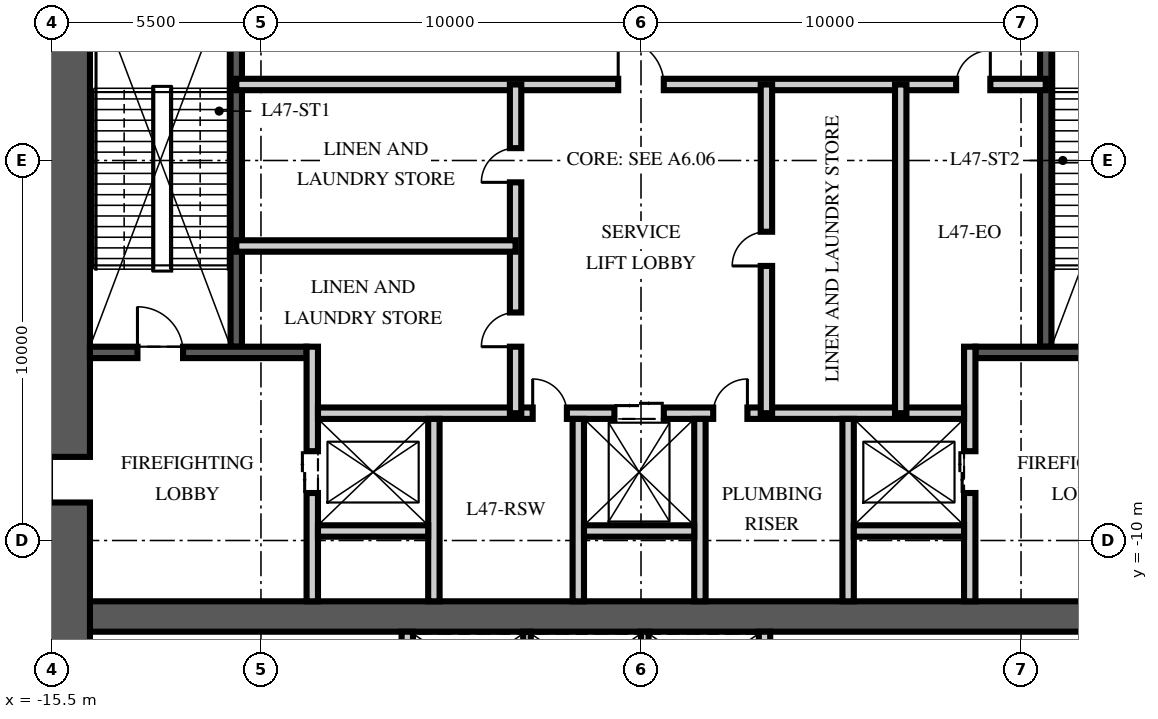
"""IFC4 building model, lengths in metres.
Left out: names, types, materials, properties, quantities, classifications, styles, units other than length and angle.
Written with IfcOpenShell. Run it as: python <this file> out.ifc"""

import sys

from ifc_helpers import new_model, si_unit, direction, frame, frame_2d, origin, place, context, subcontext, project, spatial, rectangle, extrude, element, fill, save


model = new_model("IFC4")
c1 = context("Model", 3, precision=1e-05, world=origin(), true_north=direction((0.0, 1.0)))
c2 = subcontext(c1, "Body", "Model", "MODEL_VIEW")
j1 = project(units=[si_unit("LENGTHUNIT", "METRE"), si_unit("PLANEANGLEUNIT", "RADIAN")], contexts=[c1])
p1 = place(None, origin())
s1 = spatial("IfcSite", under=j1, at=p1, CompositionType="ELEMENT")
p2 = place(p1, origin())
s2 = spatial("IfcBuilding", under=s1, at=p2, CompositionType="ELEMENT")
p3 = place(p2, frame((0.0, 0.0, 186.0)))
s3 = spatial("IfcBuildingStorey", under=s2, at=p3, CompositionType="ELEMENT", Elevation=186.0)
p4 = place(p3, frame((-15.5, -12.0, -0.3), z_axis=(0.0, 0.0, 1.0), x_axis=(1.0, 0.0, 0.0)))
e1 = element("IfcWall", 1, at=p4, inside=s3, PredefinedType="SHEAR", context=c2, shape_type="SweptSolid", body=[
    extrude(rectangle(XDim=31.0, YDim=0.8, at=frame_2d((15.5, 0.0))), origin(), (0.0, 0.0, 1.0), 5.95),
])
p5 = place(p3, frame((-15.5, -15.5, -0.3), z_axis=(0.0, 0.0, 1.0), x_axis=(0.0, 1.0, 0.0)))
e2 = element("IfcWall", 2, at=p5, inside=s3, PredefinedType="SHEAR", context=c2, shape_type="SweptSolid", body=[
    extrude(rectangle(XDim=31.0, YDim=2.0, at=frame_2d((15.5, 0.0))), origin(), (0.0, 0.0, 1.0), 5.95),
])
p6 = place(p5, frame((6.5, 0.0, 0.3)))
e3 = element("IfcOpeningElement", 3, at=p6, cuts=e2, PredefinedType="OPENING", context=c2, shape_type="SweptSolid", body=[
    extrude(rectangle(XDim=1.2, YDim=2.1, at=frame_2d((0.6, 1.05))), frame((0.0, 1.01, 0.0), z_axis=(0.0, -1.0, 0.0), x_axis=(1.0, 0.0, 0.0)), (0.0, 0.0, 1.0), 2.02),
])
p7 = place(p5, frame((23.0, 0.0, 0.3)))
e4 = element("IfcOpeningElement", 4, at=p7, cuts=e2, PredefinedType="OPENING", context=c2, shape_type="SweptSolid", body=[
    extrude(rectangle(XDim=1.8, YDim=2.1, at=frame_2d((0.9, 1.05))), frame((0.0, 1.01, 0.0), z_axis=(0.0, -1.0, 0.0), x_axis=(1.0, 0.0, 0.0)), (0.0, 0.0, 1.0), 2.02),
])
p8 = place(p3, frame((-10.65, -4.9, 0.0), z_axis=(0.0, 0.0, 1.0), x_axis=(0.0, 1.0, 0.0)))
e5 = element("IfcWall", 5, at=p8, inside=s3, PredefinedType="SOLIDWALL", context=c2, shape_type="SweptSolid", body=[
    extrude(rectangle(XDim=10.1, YDim=0.3, at=frame_2d((5.05, 0.0))), origin(), (0.0, 0.0, 1.0), 5.65),
])
p9 = place(p3, frame((-14.5, -5.05, 0.0), z_axis=(0.0, 0.0, 1.0), x_axis=(1.0, 0.0, 0.0)))
e6 = element("IfcWall", 6, at=p9, inside=s3, PredefinedType="SOLIDWALL", context=c2, shape_type="SweptSolid", body=[
    extrude(rectangle(XDim=5.7, YDim=0.3, at=frame_2d((2.85, 0.0))), origin(), (0.0, 0.0, 1.0), 5.65),
])
p10 = place(p9, frame((1.25, 0.0, 0.0)))
e7 = element("IfcOpeningElement", 7, at=p10, cuts=e6, PredefinedType="OPENING", context=c2, shape_type="SweptSolid", body=[
    extrude(rectangle(XDim=1.2, YDim=2.1, at=frame_2d((0.6, 1.05))), frame((0.0, 0.16, 0.0), z_axis=(0.0, -1.0, 0.0), x_axis=(1.0, 0.0, 0.0)), (0.0, 0.0, 1.0), 0.32),
])
p11 = place(p3, frame((-8.65, -11.6, 0.0), z_axis=(0.0, 0.0, 1.0), x_axis=(0.0, 1.0, 0.0)))
e8 = element("IfcWall", 8, at=p11, inside=s3, PredefinedType="PARTITIONING", context=c2, shape_type="SweptSolid", body=[
    extrude(rectangle(XDim=6.7, YDim=0.3, at=frame_2d((3.35, 0.0))), origin(), (0.0, 0.0, 1.0), 5.65),
])
p12 = place(p11, frame((2.85, 0.0, 0.0)))
e9 = element("IfcOpeningElement", 9, at=p12, cuts=e8, PredefinedType="OPENING", context=c2, shape_type="SweptSolid", body=[
    extrude(rectangle(XDim=1.1, YDim=2.1, at=frame_2d((0.55, 1.05))), frame((0.0, 0.16, 0.0), z_axis=(0.0, -1.0, 0.0), x_axis=(1.0, 0.0, 0.0)), (0.0, 0.0, 1.0), 0.32),
])
p13 = place(p3, frame((10.65, -4.9, 0.0), z_axis=(0.0, 0.0, 1.0), x_axis=(0.0, 1.0, 0.0)))
e10 = element("IfcWall", 10, at=p13, inside=s3, PredefinedType="SOLIDWALL", context=c2, shape_type="SweptSolid", body=[
    extrude(rectangle(XDim=10.1, YDim=0.3, at=frame_2d((5.05, 0.0))), origin(), (0.0, 0.0, 1.0), 5.65),
])
p14 = place(p3, frame((14.5, -5.05, 0.0), z_axis=(0.0, 0.0, 1.0), x_axis=(-1.0, 0.0, 0.0)))
e11 = element("IfcWall", 11, at=p14, inside=s3, PredefinedType="SOLIDWALL", context=c2, shape_type="SweptSolid", body=[
    extrude(rectangle(XDim=5.7, YDim=0.3, at=frame_2d((2.85, 0.0))), origin(), (0.0, 0.0, 1.0), 5.65),
])
p15 = place(p14, frame((1.25, 0.0, 0.0)))
e12 = element("IfcOpeningElement", 12, at=p15, cuts=e11, PredefinedType="OPENING", context=c2, shape_type="SweptSolid", body=[
    extrude(rectangle(XDim=1.2, YDim=2.1, at=frame_2d((0.6, 1.05))), frame((0.0, 0.16, 0.0), z_axis=(0.0, -1.0, 0.0), x_axis=(1.0, 0.0, 0.0)), (0.0, 0.0, 1.0), 0.32),
])
p16 = place(p3, frame((8.65, -11.6, 0.0), z_axis=(0.0, 0.0, 1.0), x_axis=(0.0, 1.0, 0.0)))
e13 = element("IfcWall", 13, at=p16, inside=s3, PredefinedType="PARTITIONING", context=c2, shape_type="SweptSolid", body=[
    extrude(rectangle(XDim=6.7, YDim=0.3, at=frame_2d((3.35, 0.0))), origin(), (0.0, 0.0, 1.0), 5.65),
])
p17 = place(p16, frame((2.85, 0.0, 0.0)))
e14 = element("IfcOpeningElement", 14, at=p17, cuts=e13, PredefinedType="OPENING", context=c2, shape_type="SweptSolid", body=[
    extrude(rectangle(XDim=1.1, YDim=2.1, at=frame_2d((0.55, 1.05))), frame((0.0, 0.16, 0.0), z_axis=(0.0, -1.0, 0.0), x_axis=(1.0, 0.0, 0.0)), (0.0, 0.0, 1.0), 0.32),
])
p18 = place(p3, frame((-8.5, -6.65, 0.0), z_axis=(0.0, 0.0, 1.0), x_axis=(1.0, 0.0, 0.0)))
e15 = element("IfcWall", 15, at=p18, inside=s3, PredefinedType="PARTITIONING", context=c2, shape_type="SweptSolid", body=[
    extrude(rectangle(XDim=17.0, YDim=0.3, at=frame_2d((8.5, 0.0))), origin(), (0.0, 0.0, 1.0), 5.65),
])
p19 = place(p18, frame((7.8, 0.0, 0.0)))
e16 = element("IfcOpeningElement", 16, at=p19, cuts=e15, PredefinedType="OPENING", context=c2, shape_type="SweptSolid", body=[
    extrude(rectangle(XDim=1.3, YDim=2.4, at=frame_2d((0.65, 1.2))), frame((0.0, 0.16, 0.0), z_axis=(0.0, -1.0, 0.0), x_axis=(1.0, 0.0, 0.0)), (0.0, 0.0, 1.0), 0.32),
])
p20 = place(p18, frame((5.65, 0.0, 0.0)))
e17 = element("IfcOpeningElement", 17, at=p20, cuts=e15, PredefinedType="OPENING", context=c2, shape_type="SweptSolid", body=[
    extrude(rectangle(XDim=0.9, YDim=2.1, at=frame_2d((0.45, 1.05))), frame((0.0, 0.16, 0.0), z_axis=(0.0, -1.0, 0.0), x_axis=(1.0, 0.0, 0.0)), (0.0, 0.0, 1.0), 0.32),
])
p21 = place(p18, frame((10.4, 0.0, 0.0)))
e18 = element("IfcOpeningElement", 18, at=p21, cuts=e15, PredefinedType="OPENING", context=c2, shape_type="SweptSolid", body=[
    extrude(rectangle(XDim=0.9, YDim=2.1, at=frame_2d((0.45, 1.05))), frame((0.0, 0.16, 0.0), z_axis=(0.0, -1.0, 0.0), x_axis=(1.0, 0.0, 0.0)), (0.0, 0.0, 1.0), 0.32),
])
for number, where, z_axis, x_axis in (
    (19, (-5.45, -11.6, 0.0), (0.0, 0.0, 1.0), (0.0, 1.0, 0.0)),
    (20, (-1.65, -11.6, 0.0), (0.0, 0.0, 1.0), (0.0, 1.0, 0.0)),
    (21, (1.55, -11.6, 0.0), (0.0, 0.0, 1.0), (0.0, 1.0, 0.0)),
    (22, (5.45, -11.6, 0.0), (0.0, 0.0, 1.0), (0.0, 1.0, 0.0)),
):
    element("IfcWall", number, at=place(p3, frame(where, z_axis=z_axis, x_axis=x_axis)), inside=s3, PredefinedType="PARTITIONING", context=c2, shape_type="SweptSolid", body=[
        extrude(rectangle(XDim=4.8, YDim=0.3, at=frame_2d((2.4, 0.0))), origin(), (0.0, 0.0, 1.0), 5.65),
    ])
for number, where, z_axis, x_axis in (
    (23, (-8.5, -9.75, 0.0), (0.0, 0.0, 1.0), (1.0, 0.0, 0.0)),
    (24, (-1.5, -9.75, 0.0), (0.0, 0.0, 1.0), (1.0, 0.0, 0.0)),
    (25, (5.6, -9.75, 0.0), (0.0, 0.0, 1.0), (1.0, 0.0, 0.0)),
):
    element("IfcWall", number, at=place(p3, frame(where, z_axis=z_axis, x_axis=x_axis)), inside=s3, PredefinedType="PARTITIONING", context=c2, shape_type="SweptSolid", body=[
        extrude(rectangle(XDim=2.9, YDim=0.3, at=frame_2d((1.45, 0.0))), origin(), (0.0, 0.0, 1.0), 5.65),
    ])
for number, where, z_axis, x_axis in (
    (26, (-6.15, -14.5, 0.0), (0.0, 0.0, 1.0), (0.0, 1.0, 0.0)),
    (27, (3.25, -14.5, 0.0), (0.0, 0.0, 1.0), (0.0, 1.0, 0.0)),
):
    element("IfcWall", number, at=place(p3, frame(where, z_axis=z_axis, x_axis=x_axis)), inside=s3, PredefinedType="PARTITIONING", context=c2, shape_type="SweptSolid", body=[
        extrude(rectangle(XDim=2.1, YDim=0.3, at=frame_2d((1.05, 0.0))), origin(), (0.0, 0.0, 1.0), 5.65),
    ])
for number, where, z_axis, x_axis in (
    (28, (-3.0, -14.5, 0.0), (0.0, 0.0, 1.0), (0.0, 1.0, 0.0)),
    (29, (0.1, -14.5, 0.0), (0.0, 0.0, 1.0), (0.0, 1.0, 0.0)),
):
    element("IfcWall", number, at=place(p3, frame(where, z_axis=z_axis, x_axis=x_axis)), inside=s3, PredefinedType="PARTITIONING", context=c2, shape_type="SweptSolid", body=[
        extrude(rectangle(XDim=2.1, YDim=0.2, at=frame_2d((1.05, 0.0))), origin(), (0.0, 0.0, 1.0), 5.65),
    ])
p22 = place(p3, frame((-10.65, 2.0, 0.0), z_axis=(0.0, 0.0, 1.0), x_axis=(1.0, 0.0, 0.0)))
e30 = element("IfcWall", 30, at=p22, inside=s3, PredefinedType="PARTITIONING", context=c2, shape_type="SweptSolid", body=[
    extrude(rectangle(XDim=21.3, YDim=0.3, at=frame_2d((10.65, 0.0))), origin(), (0.0, 0.0, 1.0), 5.65),
])
p23 = place(p22, frame((10.05, 0.0, 0.0)))
e31 = element("IfcOpeningElement", 31, at=p23, cuts=e30, PredefinedType="OPENING", context=c2, shape_type="SweptSolid", body=[
    extrude(rectangle(XDim=1.2, YDim=2.1, at=frame_2d((0.6, 1.05))), frame((0.0, 0.16, 0.0), z_axis=(0.0, -1.0, 0.0), x_axis=(1.0, 0.0, 0.0)), (0.0, 0.0, 1.0), 0.32),
])
p24 = place(p22, frame((18.942, 0.0, 0.0)))
e32 = element("IfcOpeningElement", 32, at=p24, cuts=e30, PredefinedType="OPENING", context=c2, shape_type="SweptSolid", body=[
    extrude(rectangle(XDim=0.9, YDim=2.1, at=frame_2d((0.45, 1.05))), frame((0.0, 0.16, 0.0), z_axis=(0.0, -1.0, 0.0), x_axis=(1.0, 0.0, 0.0)), (0.0, 0.0, 1.0), 0.32),
])
p25 = place(p3, frame((-3.3, -6.65, 0.0), z_axis=(0.0, 0.0, 1.0), x_axis=(0.0, 1.0, 0.0)))
e33 = element("IfcWall", 33, at=p25, inside=s3, PredefinedType="PARTITIONING", context=c2, shape_type="SweptSolid", body=[
    extrude(rectangle(XDim=8.65, YDim=0.3, at=frame_2d((4.325, 0.0))), origin(), (0.0, 0.0, 1.0), 5.65),
])
p26 = place(p25, frame((1.75, 0.0, 0.0)))
e34 = element("IfcOpeningElement", 34, at=p26, cuts=e33, PredefinedType="OPENING", context=c2, shape_type="SweptSolid", body=[
    extrude(rectangle(XDim=0.9, YDim=2.1, at=frame_2d((0.45, 1.05))), frame((0.0, 0.16, 0.0), z_axis=(0.0, -1.0, 0.0), x_axis=(1.0, 0.0, 0.0)), (0.0, 0.0, 1.0), 0.32),
])
p27 = place(p25, frame((6.075, 0.0, 0.0)))
e35 = element("IfcOpeningElement", 35, at=p27, cuts=e33, PredefinedType="OPENING", context=c2, shape_type="SweptSolid", body=[
    extrude(rectangle(XDim=0.9, YDim=2.1, at=frame_2d((0.45, 1.05))), frame((0.0, 0.16, 0.0), z_axis=(0.0, -1.0, 0.0), x_axis=(1.0, 0.0, 0.0)), (0.0, 0.0, 1.0), 0.32),
])
p28 = place(p3, frame((3.3, -6.65, 0.0), z_axis=(0.0, 0.0, 1.0), x_axis=(0.0, 1.0, 0.0)))
e36 = element("IfcWall", 36, at=p28, inside=s3, PredefinedType="PARTITIONING", context=c2, shape_type="SweptSolid", body=[
    extrude(rectangle(XDim=8.65, YDim=0.3, at=frame_2d((4.325, 0.0))), origin(), (0.0, 0.0, 1.0), 5.65),
])
p29 = place(p28, frame((3.875, 0.0, 0.0)))
e37 = element("IfcOpeningElement", 37, at=p29, cuts=e36, PredefinedType="OPENING", context=c2, shape_type="SweptSolid", body=[
    extrude(rectangle(XDim=0.9, YDim=2.1, at=frame_2d((0.45, 1.05))), frame((0.0, 0.16, 0.0), z_axis=(0.0, -1.0, 0.0), x_axis=(1.0, 0.0, 0.0)), (0.0, 0.0, 1.0), 0.32),
])
p30 = place(p3, frame((-10.65, -2.25, 0.0), z_axis=(0.0, 0.0, 1.0), x_axis=(1.0, 0.0, 0.0)))
e38 = element("IfcWall", 38, at=p30, inside=s3, PredefinedType="PARTITIONING", context=c2, shape_type="SweptSolid", body=[
    extrude(rectangle(XDim=7.35, YDim=0.3, at=frame_2d((3.675, 0.0))), origin(), (0.0, 0.0, 1.0), 5.65),
])
p31 = place(p3, frame((6.834, -6.65, 0.0), z_axis=(0.0, 0.0, 1.0), x_axis=(0.0, 1.0, 0.0)))
e39 = element("IfcWall", 39, at=p31, inside=s3, PredefinedType="PARTITIONING", context=c2, shape_type="SweptSolid", body=[
    extrude(rectangle(XDim=8.65, YDim=0.3, at=frame_2d((4.325, 0.0))), origin(), (0.0, 0.0, 1.0), 5.65),
])
p32 = place(p10, origin())
e40 = element("IfcDoor", 40, at=p32, inside=s3, OperationType="SINGLE_SWING_LEFT", PredefinedType="DOOR", context=c2, shape_type="SweptSolid", body=[
    extrude(rectangle(XDim=1.2, YDim=2.1, at=frame_2d((0.6, 1.05))), frame((0.0, 0.025, 0.0), z_axis=(0.0, -1.0, 0.0), x_axis=(1.0, 0.0, 0.0)), (0.0, 0.0, 1.0), 0.05),
])
fill(e7, e40)
p33 = place(p6, origin())
e41 = element("IfcDoor", 41, at=p33, inside=s3, OperationType="SINGLE_SWING_LEFT", PredefinedType="DOOR", context=c2, shape_type="SweptSolid", body=[
    extrude(rectangle(XDim=1.2, YDim=2.1, at=frame_2d((0.6, 1.05))), frame((0.0, 0.025, 0.0), z_axis=(0.0, -1.0, 0.0), x_axis=(1.0, 0.0, 0.0)), (0.0, 0.0, 1.0), 0.05),
])
fill(e3, e41)
p34 = place(p12, origin())
e42 = element("IfcDoor", 42, at=p34, inside=s3, OperationType="DOUBLE_DOOR_SLIDING", PredefinedType="DOOR", context=c2, shape_type="SweptSolid", body=[
    extrude(rectangle(XDim=1.1, YDim=2.1, at=frame_2d((0.55, 1.05))), frame((0.0, 0.025, 0.0), z_axis=(0.0, -1.0, 0.0), x_axis=(1.0, 0.0, 0.0)), (0.0, 0.0, 1.0), 0.05),
])
fill(e9, e42)
p35 = place(p17, origin())
e43 = element("IfcDoor", 43, at=p35, inside=s3, OperationType="DOUBLE_DOOR_SLIDING", PredefinedType="DOOR", context=c2, shape_type="SweptSolid", body=[
    extrude(rectangle(XDim=1.1, YDim=2.1, at=frame_2d((0.55, 1.05))), frame((0.0, 0.025, 0.0), z_axis=(0.0, -1.0, 0.0), x_axis=(1.0, 0.0, 0.0)), (0.0, 0.0, 1.0), 0.05),
])
fill(e14, e43)
p36 = place(p19, origin())
e44 = element("IfcDoor", 44, at=p36, inside=s3, OperationType="DOUBLE_DOOR_SLIDING", PredefinedType="DOOR", context=c2, shape_type="SweptSolid", body=[
    extrude(rectangle(XDim=1.3, YDim=2.4, at=frame_2d((0.65, 1.2))), frame((0.0, 0.025, 0.0), z_axis=(0.0, -1.0, 0.0), x_axis=(1.0, 0.0, 0.0)), (0.0, 0.0, 1.0), 0.05),
])
fill(e16, e44)
p37 = place(p23, origin())
e45 = element("IfcDoor", 45, at=p37, inside=s3, OperationType="SINGLE_SWING_LEFT", PredefinedType="DOOR", context=c2, shape_type="SweptSolid", body=[
    extrude(rectangle(XDim=1.2, YDim=2.1, at=frame_2d((0.6, 1.05))), frame((0.0, 0.025, 0.0), z_axis=(0.0, -1.0, 0.0), x_axis=(1.0, 0.0, 0.0)), (0.0, 0.0, 1.0), 0.05),
])
fill(e31, e45)
p38 = place(p20, origin())
e46 = element("IfcDoor", 46, at=p38, inside=s3, OperationType="SINGLE_SWING_LEFT", PredefinedType="DOOR", context=c2, shape_type="SweptSolid", body=[
    extrude(rectangle(XDim=0.9, YDim=2.1, at=frame_2d((0.45, 1.05))), frame((0.0, 0.025, 0.0), z_axis=(0.0, -1.0, 0.0), x_axis=(1.0, 0.0, 0.0)), (0.0, 0.0, 1.0), 0.05),
])
fill(e17, e46)
p39 = place(p21, origin())
e47 = element("IfcDoor", 47, at=p39, inside=s3, OperationType="SINGLE_SWING_RIGHT", PredefinedType="DOOR", context=c2, shape_type="SweptSolid", body=[
    extrude(rectangle(XDim=0.9, YDim=2.1, at=frame_2d((0.45, 1.05))), frame((0.0, 0.025, 0.0), z_axis=(0.0, -1.0, 0.0), x_axis=(1.0, 0.0, 0.0)), (0.0, 0.0, 1.0), 0.05),
])
fill(e18, e47)
p40 = place(p26, origin())
e48 = element("IfcDoor", 48, at=p40, inside=s3, OperationType="SINGLE_SWING_LEFT", PredefinedType="DOOR", context=c2, shape_type="SweptSolid", body=[
    extrude(rectangle(XDim=0.9, YDim=2.1, at=frame_2d((0.45, 1.05))), frame((0.0, 0.025, 0.0), z_axis=(0.0, -1.0, 0.0), x_axis=(1.0, 0.0, 0.0)), (0.0, 0.0, 1.0), 0.05),
])
fill(e34, e48)
p41 = place(p27, origin())
e49 = element("IfcDoor", 49, at=p41, inside=s3, OperationType="SINGLE_SWING_LEFT", PredefinedType="DOOR", context=c2, shape_type="SweptSolid", body=[
    extrude(rectangle(XDim=0.9, YDim=2.1, at=frame_2d((0.45, 1.05))), frame((0.0, 0.025, 0.0), z_axis=(0.0, -1.0, 0.0), x_axis=(1.0, 0.0, 0.0)), (0.0, 0.0, 1.0), 0.05),
])
fill(e35, e49)
p42 = place(p29, origin())
e50 = element("IfcDoor", 50, at=p42, inside=s3, OperationType="SINGLE_SWING_LEFT", PredefinedType="DOOR", context=c2, shape_type="SweptSolid", body=[
    extrude(rectangle(XDim=0.9, YDim=2.1, at=frame_2d((0.45, 1.05))), frame((0.0, 0.025, 0.0), z_axis=(0.0, -1.0, 0.0), x_axis=(1.0, 0.0, 0.0)), (0.0, 0.0, 1.0), 0.05),
])
fill(e37, e50)
p43 = place(p24, origin())
e51 = element("IfcDoor", 51, at=p43, inside=s3, OperationType="SINGLE_SWING_RIGHT", PredefinedType="DOOR", context=c2, shape_type="SweptSolid", body=[
    extrude(rectangle(XDim=0.9, YDim=2.1, at=frame_2d((0.45, 1.05))), frame((0.0, 0.025, 0.0), z_axis=(0.0, -1.0, 0.0), x_axis=(1.0, 0.0, 0.0)), (0.0, 0.0, 1.0), 0.05),
])
fill(e32, e51)
save(model, sys.argv[1])
